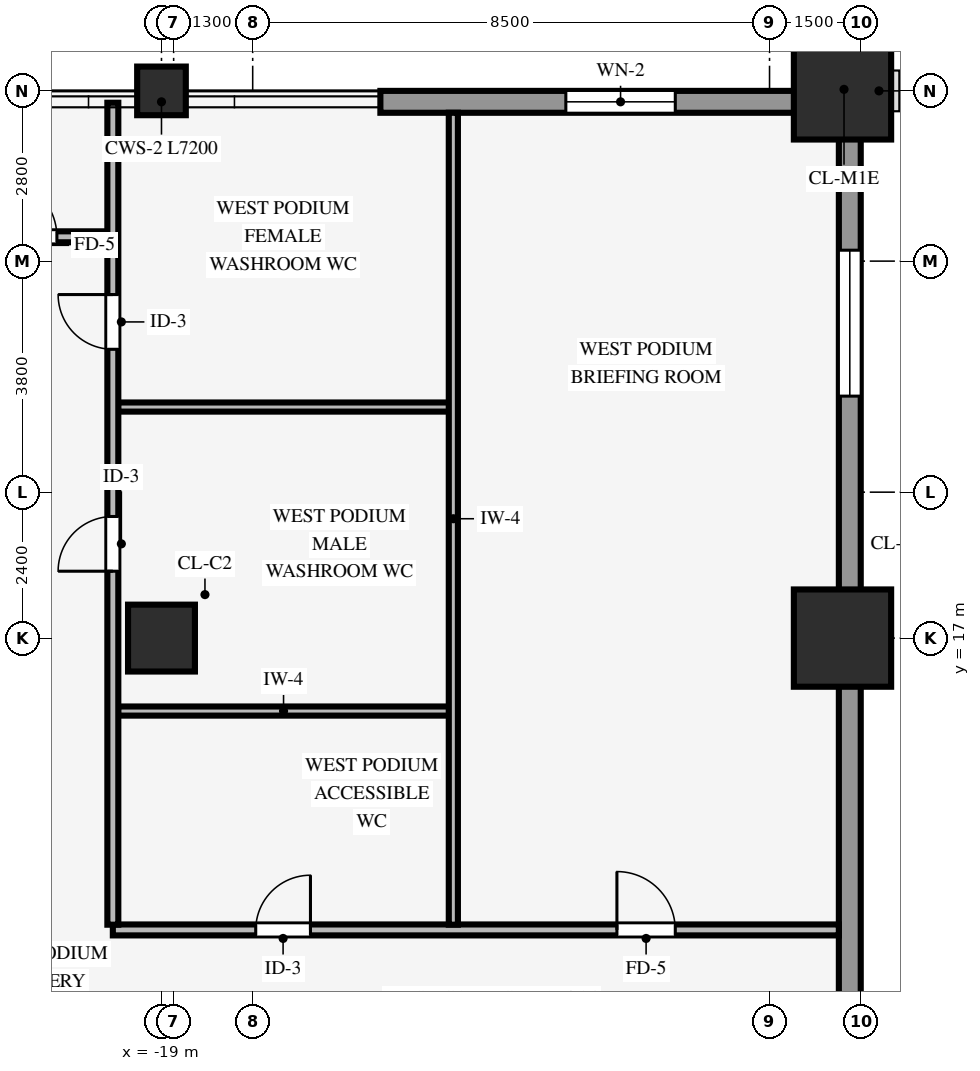
"""IFC4 building model, lengths in metres.
Left out: names, types, materials, properties, quantities, classifications, styles, units other than length and angle.
Written with IfcOpenShell. Run it as: python <this file> out.ifc"""

import sys

from ifc_helpers import new_model, si_unit, direction, frame, frame_2d, origin, origin_2d, place, context, subcontext, project, spatial, rectangle, hollow_rectangle, extrude, source, transform, mapped, element, fill, save


model = new_model("IFC4")
c1 = context("Model", 3, precision=1e-05, world=origin(), true_north=direction((0.0, 1.0)))
c2 = subcontext(c1, "Body", "Model", "MODEL_VIEW")
j1 = project(units=[si_unit("LENGTHUNIT", "METRE"), si_unit("PLANEANGLEUNIT", "RADIAN")], contexts=[c1])
p1 = place(None, origin())
s1 = spatial("IfcSite", under=j1, at=p1, CompositionType="ELEMENT")
p2 = place(p1, origin())
s2 = spatial("IfcBuilding", under=s1, at=p2, CompositionType="ELEMENT")
p3 = place(p2, frame((0.0, 0.0, 4.6)))
s3 = spatial("IfcBuildingStorey", under=s2, at=p3, CompositionType="ELEMENT", Elevation=4.6)
for number, where, z_axis, x_axis in (
    (1, (-7.8, 17.0, 0.0), (0.0, 0.0, 1.0), (1.0, 0.0, 0.0)),
    (2, (-7.8, 26.0, 0.0), (0.0, 0.0, 1.0), (1.0, 0.0, 0.0)),
):
    element("IfcColumn", number, at=place(p3, frame(where, z_axis=z_axis, x_axis=x_axis)), inside=s3, PredefinedType="COLUMN", context=c2, shape_type="SweptSolid", body=[
        extrude(rectangle(XDim=1.6, YDim=1.6, at=origin_2d()), origin(), (0.0, 0.0, 1.0), 4.28),
    ])
p4 = place(p3, frame((-19.0, 17.0, 0.0), z_axis=(0.0, 0.0, 1.0), x_axis=(1.0, 0.0, 0.0)))
e3 = element("IfcColumn", 3, at=p4, inside=s3, PredefinedType="COLUMN", context=c2, shape_type="SweptSolid", body=[
    extrude(rectangle(XDim=1.1, YDim=1.1, at=origin_2d()), origin(), (0.0, 0.0, 1.0), 4.28),
])
p5 = place(p3, frame((-19.0, 26.0, 0.0), z_axis=(0.0, 0.0, 1.0), x_axis=(1.0, 0.0, 0.0)))
e4 = element("IfcColumn", 4, at=p5, inside=s3, PredefinedType="COLUMN", context=c2, shape_type="SweptSolid", body=[
    extrude(hollow_rectangle(XDim=0.8, YDim=0.8, WallThickness=0.055, InnerFilletRadius=0.055, OuterFilletRadius=0.11, at=origin_2d()), origin(), (0.0, 0.0, 1.0), 4.28),
])
p6 = place(p3, frame((-7.68, -25.644, 0.0), z_axis=(0.0, 0.0, 1.0), x_axis=(0.0, 1.0, 0.0)))
e5 = element("IfcWall", 5, at=p6, inside=s3, PredefinedType="STANDARD", context=c2, shape_type="SweptSolid", body=[
    extrude(rectangle(XDim=51.288, YDim=0.36, at=frame_2d((25.644, 0.0))), origin(), (0.0, 0.0, 1.0), 3.649),
])
p7 = place(p6, frame((2.264, 0.0, 0.85)))
e6 = element("IfcOpeningElement", 6, at=p7, cuts=e5, PredefinedType="OPENING", context=c2, shape_type="SweptSolid", body=[
    extrude(rectangle(XDim=2.4, YDim=2.45, at=frame_2d((1.2, 1.225))), frame((0.0, 0.19, 0.0), z_axis=(0.0, -1.0, 0.0), x_axis=(1.0, 0.0, 0.0)), (0.0, 0.0, 1.0), 0.38),
])
p8 = place(p6, frame((17.051, 0.0, 0.85)))
e7 = element("IfcOpeningElement", 7, at=p8, cuts=e5, PredefinedType="OPENING", context=c2, shape_type="SweptSolid", body=[
    extrude(rectangle(XDim=2.4, YDim=2.45, at=frame_2d((1.2, 1.225))), frame((0.0, 0.19, 0.0), z_axis=(0.0, -1.0, 0.0), x_axis=(1.0, 0.0, 0.0)), (0.0, 0.0, 1.0), 0.38),
])
p9 = place(p6, frame((21.979, 0.0, 0.85)))
e8 = element("IfcOpeningElement", 8, at=p9, cuts=e5, PredefinedType="OPENING", context=c2, shape_type="SweptSolid", body=[
    extrude(rectangle(XDim=2.4, YDim=2.45, at=frame_2d((1.2, 1.225))), frame((0.0, 0.19, 0.0), z_axis=(0.0, -1.0, 0.0), x_axis=(1.0, 0.0, 0.0)), (0.0, 0.0, 1.0), 0.38),
])
p10 = place(p6, frame((26.908, 0.0, 0.85)))
e9 = element("IfcOpeningElement", 9, at=p10, cuts=e5, PredefinedType="OPENING", context=c2, shape_type="SweptSolid", body=[
    extrude(rectangle(XDim=2.4, YDim=2.45, at=frame_2d((1.2, 1.225))), frame((0.0, 0.19, 0.0), z_axis=(0.0, -1.0, 0.0), x_axis=(1.0, 0.0, 0.0)), (0.0, 0.0, 1.0), 0.38),
])
p11 = place(p6, frame((31.837, 0.0, 0.85)))
e10 = element("IfcOpeningElement", 10, at=p11, cuts=e5, PredefinedType="OPENING", context=c2, shape_type="SweptSolid", body=[
    extrude(rectangle(XDim=2.4, YDim=2.45, at=frame_2d((1.2, 1.225))), frame((0.0, 0.19, 0.0), z_axis=(0.0, -1.0, 0.0), x_axis=(1.0, 0.0, 0.0)), (0.0, 0.0, 1.0), 0.38),
])
p12 = place(p6, frame((46.624, 0.0, 0.85)))
e11 = element("IfcOpeningElement", 11, at=p12, cuts=e5, PredefinedType="OPENING", context=c2, shape_type="SweptSolid", body=[
    extrude(rectangle(XDim=2.4, YDim=2.45, at=frame_2d((1.2, 1.225))), frame((0.0, 0.19, 0.0), z_axis=(0.0, -1.0, 0.0), x_axis=(1.0, 0.0, 0.0)), (0.0, 0.0, 1.0), 0.38),
])
p13 = place(p3, frame((-15.4, 25.82, 0.0), z_axis=(0.0, 0.0, 1.0), x_axis=(1.0, 0.0, 0.0)))
e12 = element("IfcWall", 12, at=p13, inside=s3, PredefinedType="STANDARD", context=c2, shape_type="SweptSolid", body=[
    extrude(rectangle(XDim=7.9, YDim=0.36, at=frame_2d((3.95, 0.0))), origin(), (0.0, 0.0, 1.0), 3.615),
])
p14 = place(p13, frame((3.05, 0.0, 0.85)))
e13 = element("IfcOpeningElement", 13, at=p14, cuts=e12, PredefinedType="OPENING", context=c2, shape_type="SweptSolid", body=[
    extrude(rectangle(XDim=1.8, YDim=2.35, at=frame_2d((0.9, 1.175))), frame((0.0, 0.19, 0.0), z_axis=(0.0, -1.0, 0.0), x_axis=(1.0, 0.0, 0.0)), (0.0, 0.0, 1.0), 0.38),
])
p15 = place(p3, frame((-19.8, 12.2, 0.0), z_axis=(0.0, 0.0, 1.0), x_axis=(1.0, 0.0, 0.0)))
e14 = element("IfcWall", 14, at=p15, inside=s3, PredefinedType="PARTITIONING", context=c2, shape_type="SweptSolid", body=[
    extrude(rectangle(XDim=11.94, YDim=0.18, at=frame_2d((5.97, 0.0))), origin(), (0.0, 0.0, 1.0), 4.27),
])
p16 = place(p15, frame((8.29, 0.0, 0.0)))
e15 = element("IfcOpeningElement", 15, at=p16, cuts=e14, PredefinedType="OPENING", context=c2, shape_type="SweptSolid", body=[
    extrude(rectangle(XDim=0.96, YDim=2.1, at=frame_2d((0.48, 1.05))), frame((0.0, 0.1, 0.0), z_axis=(0.0, -1.0, 0.0), x_axis=(1.0, 0.0, 0.0)), (0.0, 0.0, 1.0), 0.2),
])
p17 = place(p15, frame((2.35, 0.0, 0.0)))
e16 = element("IfcOpeningElement", 16, at=p17, cuts=e14, PredefinedType="OPENING", context=c2, shape_type="SweptSolid", body=[
    extrude(rectangle(XDim=0.9, YDim=2.1, at=frame_2d((0.45, 1.05))), frame((0.0, 0.1, 0.0), z_axis=(0.0, -1.0, 0.0), x_axis=(1.0, 0.0, 0.0)), (0.0, 0.0, 1.0), 0.2),
])
for number, where, z_axis, x_axis in (
    (17, (-19.714, 15.8, 0.0), (0.0, 0.0, 1.0), (1.0, 0.0, 0.0)),
    (18, (-19.714, 20.8, 0.0), (0.0, 0.0, 1.0), (1.0, 0.0, 0.0)),
):
    element("IfcWall", number, at=place(p3, frame(where, z_axis=z_axis, x_axis=x_axis)), inside=s3, PredefinedType="PARTITIONING", context=c2, shape_type="SweptSolid", body=[
        extrude(rectangle(XDim=5.443, YDim=0.15, at=frame_2d((2.722, 0.0))), origin(), (0.0, 0.0, 1.0), 4.27),
    ])
p18 = place(p3, frame((-22.514, 23.6, 0.0), z_axis=(0.0, 0.0, 1.0), x_axis=(1.0, 0.0, 0.0)))
e19 = element("IfcWall", 19, at=p18, inside=s3, PredefinedType="PARTITIONING", context=c2, shape_type="SweptSolid", body=[
    extrude(rectangle(XDim=2.628, YDim=0.18, at=frame_2d((1.314, 0.0))), origin(), (0.0, 0.0, 1.0), 4.27),
])
p19 = place(p18, frame((0.834, 0.0, 0.0)))
e20 = element("IfcOpeningElement", 20, at=p19, cuts=e19, PredefinedType="OPENING", context=c2, shape_type="SweptSolid", body=[
    extrude(rectangle(XDim=0.96, YDim=2.1, at=frame_2d((0.48, 1.05))), frame((0.0, 0.1, 0.0), z_axis=(0.0, -1.0, 0.0), x_axis=(1.0, 0.0, 0.0)), (0.0, 0.0, 1.0), 0.2),
])
p20 = place(p3, frame((-19.8, 12.286, 0.0), z_axis=(0.0, 0.0, 1.0), x_axis=(0.0, 1.0, 0.0)))
e21 = element("IfcWall", 21, at=p20, inside=s3, PredefinedType="PARTITIONING", context=c2, shape_type="SweptSolid", body=[
    extrude(rectangle(XDim=13.519, YDim=0.18, at=frame_2d((6.76, 0.0))), origin(), (0.0, 0.0, 1.0), 4.27),
])
p21 = place(p20, frame((5.814, 0.0, 0.0)))
e22 = element("IfcOpeningElement", 22, at=p21, cuts=e21, PredefinedType="OPENING", context=c2, shape_type="SweptSolid", body=[
    extrude(rectangle(XDim=0.9, YDim=2.1, at=frame_2d((0.45, 1.05))), frame((0.0, 0.1, 0.0), z_axis=(0.0, -1.0, 0.0), x_axis=(1.0, 0.0, 0.0)), (0.0, 0.0, 1.0), 0.2),
])
p22 = place(p20, frame((9.464, 0.0, 0.0)))
e23 = element("IfcOpeningElement", 23, at=p22, cuts=e21, PredefinedType="OPENING", context=c2, shape_type="SweptSolid", body=[
    extrude(rectangle(XDim=0.9, YDim=2.1, at=frame_2d((0.45, 1.05))), frame((0.0, 0.1, 0.0), z_axis=(0.0, -1.0, 0.0), x_axis=(1.0, 0.0, 0.0)), (0.0, 0.0, 1.0), 0.2),
])
p23 = place(p3, frame((-14.2, 12.286, 0.0), z_axis=(0.0, 0.0, 1.0), x_axis=(0.0, 1.0, 0.0)))
e24 = element("IfcWall", 24, at=p23, inside=s3, PredefinedType="PARTITIONING", context=c2, shape_type="SweptSolid", body=[
    extrude(rectangle(XDim=13.354, YDim=0.15, at=frame_2d((6.677, 0.0))), origin(), (0.0, 0.0, 1.0), 4.27),
])
m1 = source(origin(), c2, "Body", "SweptSolid", [
    extrude(rectangle(XDim=2.4, YDim=2.45, at=frame_2d((1.2, 1.225))), frame((0.0, 0.03, 0.0), z_axis=(0.0, -1.0, 0.0), x_axis=(1.0, 0.0, 0.0)), (0.0, 0.0, 1.0), 0.06),
])
p24 = place(p12, origin())
e25 = element("IfcWindow", 25, at=p24, inside=s3, PartitioningType="SINGLE_PANEL", PredefinedType="WINDOW", context=c2, shape_type="MappedRepresentation", body=[
    mapped(m1, transform((0.0, 0.0, 0.0), scale=1.0)),
])
fill(e11, e25)
m2 = source(origin(), c2, "Body", "SweptSolid", [
    extrude(rectangle(XDim=1.8, YDim=2.35, at=frame_2d((0.9, 1.175))), frame((0.0, 0.03, 0.0), z_axis=(0.0, -1.0, 0.0), x_axis=(1.0, 0.0, 0.0)), (0.0, 0.0, 1.0), 0.06),
])
p25 = place(p14, origin())
e26 = element("IfcWindow", 26, at=p25, inside=s3, PartitioningType="SINGLE_PANEL", PredefinedType="WINDOW", context=c2, shape_type="MappedRepresentation", body=[
    mapped(m2, transform((0.0, 0.0, 0.0), scale=1.0)),
])
fill(e13, e26)
m3 = source(origin(), c2, "Body", "SweptSolid", [
    extrude(rectangle(XDim=0.96, YDim=2.1, at=frame_2d((0.48, 1.05))), frame((0.0, 0.025, 0.0), z_axis=(0.0, -1.0, 0.0), x_axis=(1.0, 0.0, 0.0)), (0.0, 0.0, 1.0), 0.05),
])
p26 = place(p16, origin())
e27 = element("IfcDoor", 27, at=p26, inside=s3, OperationType="SINGLE_SWING_LEFT", PredefinedType="DOOR", context=c2, shape_type="MappedRepresentation", body=[
    mapped(m3, transform((0.0, 0.0, 0.0), scale=1.0)),
])
fill(e15, e27)
m4 = source(origin(), c2, "Body", "SweptSolid", [
    extrude(rectangle(XDim=0.9, YDim=2.1, at=frame_2d((0.45, 1.05))), frame((0.0, 0.025, 0.0), z_axis=(0.0, -1.0, 0.0), x_axis=(1.0, 0.0, 0.0)), (0.0, 0.0, 1.0), 0.05),
])
p27 = place(p17, origin())
e28 = element("IfcDoor", 28, at=p27, inside=s3, OperationType="SINGLE_SWING_RIGHT", PredefinedType="DOOR", context=c2, shape_type="MappedRepresentation", body=[
    mapped(m4, transform((0.0, 0.0, 0.0), scale=1.0)),
])
fill(e16, e28)
p28 = place(p21, origin())
e29 = element("IfcDoor", 29, at=p28, inside=s3, OperationType="SINGLE_SWING_LEFT", PredefinedType="DOOR", context=c2, shape_type="MappedRepresentation", body=[
    mapped(m4, transform((0.0, 0.0, 0.0), scale=1.0)),
])
fill(e22, e29)
p29 = place(p22, origin())
e30 = element("IfcDoor", 30, at=p29, inside=s3, OperationType="SINGLE_SWING_RIGHT", PredefinedType="DOOR", context=c2, shape_type="MappedRepresentation", body=[
    mapped(m4, transform((0.0, 0.0, 0.0), scale=1.0)),
])
fill(e23, e30)
p30 = place(p19, origin())
e31 = element("IfcDoor", 31, at=p30, inside=s3, OperationType="SINGLE_SWING_LEFT", PredefinedType="DOOR", context=c2, shape_type="MappedRepresentation", body=[
    mapped(m3, transform((0.0, 0.0, 0.0), scale=1.0)),
])
fill(e20, e31)
save(model, sys.argv[1])
